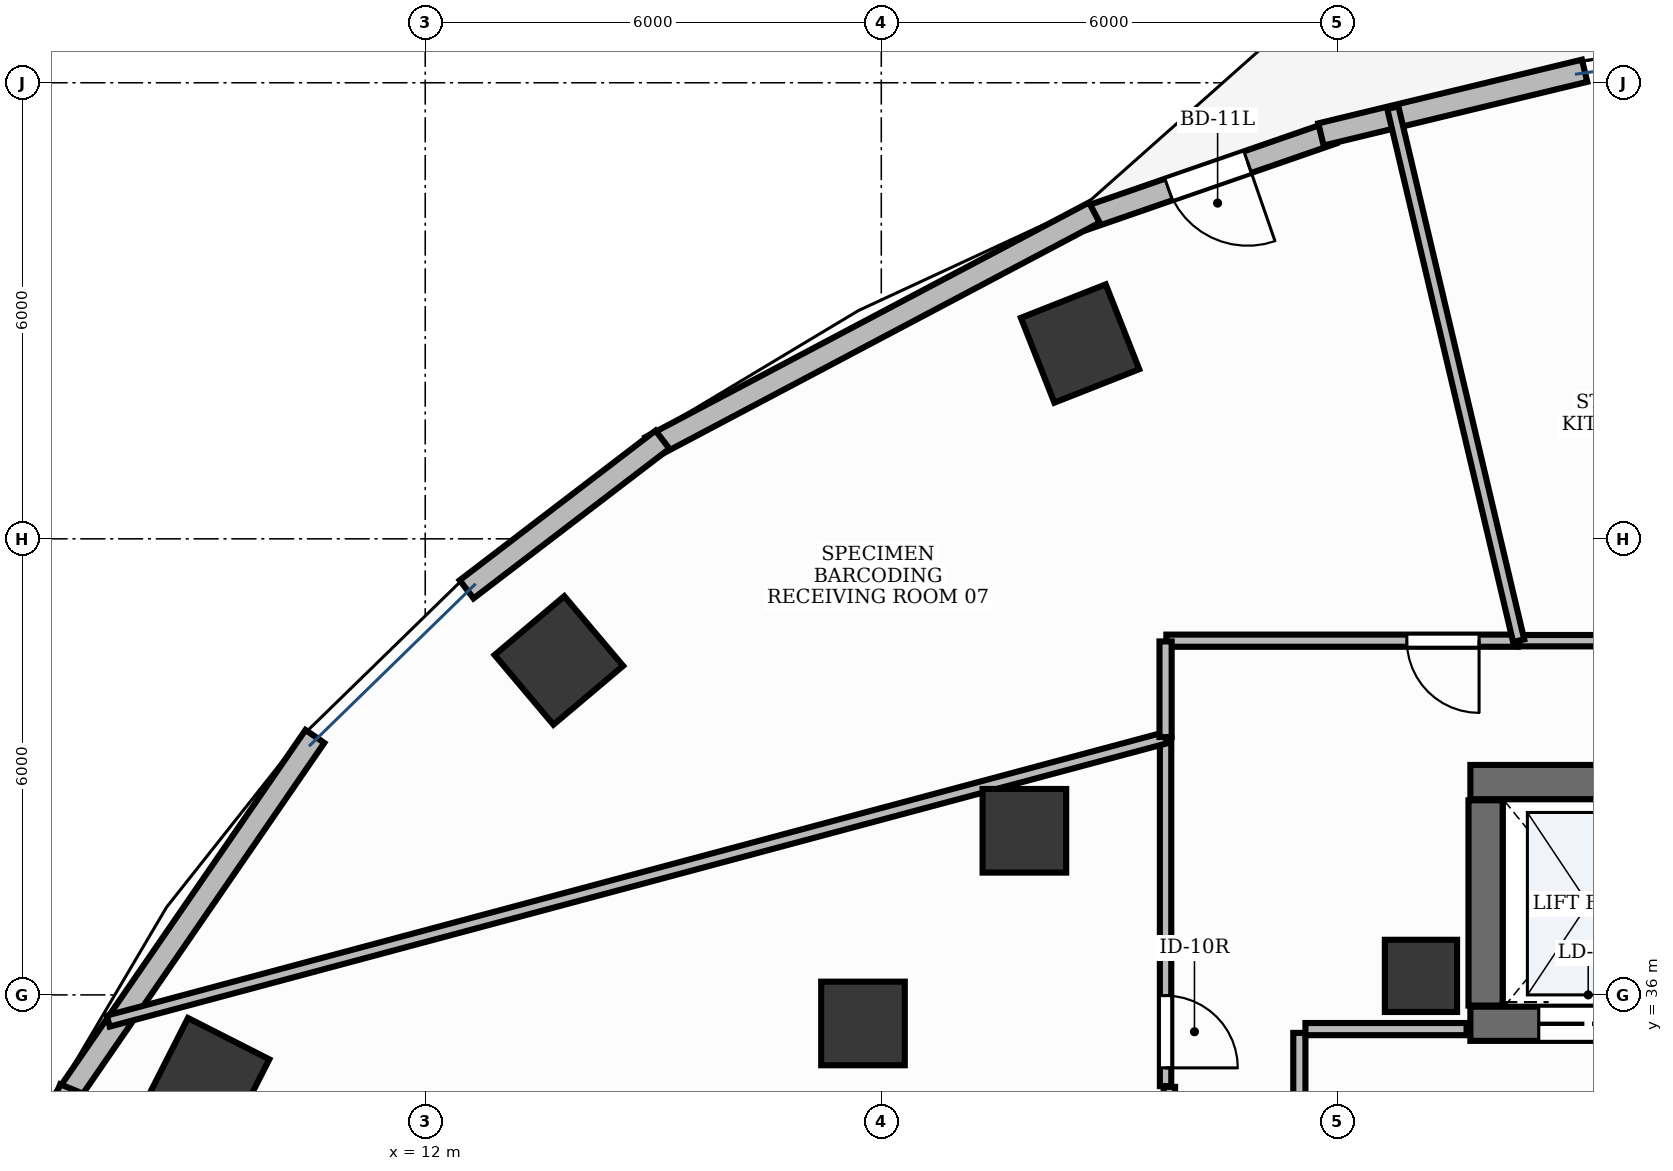
"""IFC4 building model, lengths in metres.
Left out: names, types, materials, properties, quantities, classifications, styles, units other than length and angle.
Written with IfcOpenShell. Run it as: python <this file> out.ifc"""

import sys

from ifc_helpers import new_model, si_unit, direction, frame, frame_2d, origin, origin_2d, place, context, subcontext, project, spatial, rectangle, extrude, element, fill, save


model = new_model("IFC4")
c1 = context("Model", 3, precision=1e-05, world=origin(), true_north=direction((0.0, 1.0)))
c2 = subcontext(c1, "Body", "Model", "MODEL_VIEW")
j1 = project(units=[si_unit("LENGTHUNIT", "METRE"), si_unit("PLANEANGLEUNIT", "RADIAN")], contexts=[c1])
p1 = place(None, origin())
s1 = spatial("IfcSite", under=j1, at=p1, CompositionType="ELEMENT")
p2 = place(p1, origin())
s2 = spatial("IfcBuilding", under=s1, at=p2, CompositionType="ELEMENT")
p3 = place(p2, frame((0.0, 0.0, 136.2)))
s3 = spatial("IfcBuildingStorey", under=s2, at=p3, CompositionType="ELEMENT", Elevation=136.2)
p4 = place(p3, frame((25.75, 38.8, 0.0), z_axis=(0.0, 0.0, 1.0), x_axis=(1.0, 0.0, 0.0)))
e1 = element("IfcWall", 1, at=p4, inside=s3, PredefinedType="SHEAR", context=c2, shape_type="SweptSolid", body=[
    extrude(rectangle(XDim=3.1, YDim=0.45, at=frame_2d((1.55, 0.0))), origin(), (0.0, 0.0, 1.0), 3.9),
])
p5 = place(p3, frame((25.75, 35.62, 0.0), z_axis=(0.0, 0.0, 1.0), x_axis=(1.0, 0.0, 0.0)))
e2 = element("IfcWall", 2, at=p5, inside=s3, PredefinedType="SHEAR", context=c2, shape_type="SweptSolid", body=[
    extrude(rectangle(XDim=3.1, YDim=0.45, at=frame_2d((1.55, 0.0))), origin(), (0.0, 0.0, 1.0), 3.9),
])
p6 = place(p5, frame((0.9, 0.0, 0.0)))
e3 = element("IfcOpeningElement", 3, at=p6, cuts=e2, PredefinedType="OPENING", context=c2, shape_type="SweptSolid", body=[
    extrude(rectangle(XDim=1.3, YDim=2.2, at=frame_2d((0.65, 1.1))), frame((0.0, 0.24, 0.0), z_axis=(0.0, -1.0, 0.0), x_axis=(1.0, 0.0, 0.0)), (0.0, 0.0, 1.0), 0.48),
])
p7 = place(p3, frame((25.95, 35.86, 0.0), z_axis=(0.0, 0.0, 1.0), x_axis=(0.0, 1.0, 0.0)))
e4 = element("IfcWall", 4, at=p7, inside=s3, PredefinedType="SHEAR", context=c2, shape_type="SweptSolid", body=[
    extrude(rectangle(XDim=2.7, YDim=0.45, at=frame_2d((1.35, 0.0))), origin(), (0.0, 0.0, 1.0), 3.9),
])
p8 = place(p3, frame((25.1, 36.25, -0.0), z_axis=(0.0, 0.0, 1.0), x_axis=(1.0, 0.0, 0.0)))
e5 = element("IfcColumn", 5, at=p8, inside=s3, PredefinedType="PILASTER", context=c2, shape_type="SweptSolid", body=[
    extrude(rectangle(XDim=0.95, YDim=0.95, at=origin_2d()), origin(), (0.0, 0.0, 1.0), 3.901),
])
for number, where, z_axis, x_axis in (
    (6, (20.615, 44.569, -0.0), (0.0, 0.0, 1.0), (0.93, 0.367, 0.0)),
    (7, (13.758, 40.4, -0.0), (0.0, 0.0, 1.0), (0.764, 0.645, 0.0)),
):
    element("IfcColumn", number, at=place(p3, frame(where, z_axis=z_axis, x_axis=x_axis)), inside=s3, PredefinedType="COLUMN", context=c2, shape_type="SweptSolid", body=[
        extrude(rectangle(XDim=1.2, YDim=1.2, at=origin_2d()), origin(), (0.0, 0.0, 1.0), 3.901),
    ])
p9 = place(p3, frame((19.883, 38.159, -0.0), z_axis=(0.0, 0.0, 1.0), x_axis=(1.0, 0.0, 0.0)))
e8 = element("IfcColumn", 8, at=p9, inside=s3, PredefinedType="COLUMN", context=c2, shape_type="SweptSolid", body=[
    extrude(rectangle(XDim=1.1, YDim=1.1, at=origin_2d()), origin(), (0.0, 0.0, 1.0), 3.901),
])
p10 = place(p3, frame((9.142, 34.889, -0.0), z_axis=(0.0, 0.0, 1.0), x_axis=(0.453057191132, 0.891481453292, 0.0)))
e9 = element("IfcColumn", 9, at=p10, inside=s3, PredefinedType="COLUMN", context=c2, shape_type="SweptSolid", body=[
    extrude(rectangle(XDim=1.2, YDim=1.2, at=origin_2d()), origin(), (0.0, 0.0, 1.0), 3.901),
])
p11 = place(p3, frame((17.759, 35.624, -0.0), z_axis=(0.0, 0.0, 1.0), x_axis=(1.0, 0.0, 0.0)))
e10 = element("IfcColumn", 10, at=p11, inside=s3, PredefinedType="COLUMN", context=c2, shape_type="SweptSolid", body=[
    extrude(rectangle(XDim=1.1, YDim=1.1, at=origin_2d()), origin(), (0.0, 0.0, 1.0), 3.901),
])
p12 = place(p3, frame((23.938, 47.343, 0.0), z_axis=(0.0, 0.0, 1.0), x_axis=(-0.944878029854, -0.3274225232, 0.0)))
e11 = element("IfcWall", 11, at=p12, inside=s3, PredefinedType="STANDARD", context=c2, shape_type="SweptSolid", body=[
    extrude(rectangle(XDim=3.467, YDim=0.3, at=frame_2d((1.734, 0.0))), origin(), (0.0, 0.0, 1.0), 3.9),
])
p13 = place(p12, frame((1.184, 0.0, 0.0)))
e12 = element("IfcOpeningElement", 12, at=p13, cuts=e11, PredefinedType="OPENING", context=c2, shape_type="SweptSolid", body=[
    extrude(rectangle(XDim=1.1, YDim=2.15, at=frame_2d((0.55, 1.075))), frame((0.0, 0.165, 0.0), z_axis=(0.0, -1.0, 0.0), x_axis=(1.0, 0.0, 0.0)), (0.0, 0.0, 1.0), 0.33),
])
p14 = place(p3, frame((27.253, 48.158, 0.0), z_axis=(0.0, 0.0, 1.0), x_axis=(-0.972043452321, -0.234801036625, 0.0)))
e13 = element("IfcWall", 13, at=p14, inside=s3, PredefinedType="STANDARD", context=c2, shape_type="SweptSolid", body=[
    extrude(rectangle(XDim=3.569, YDim=0.3, at=frame_2d((1.784, 0.0))), origin(), (0.0, 0.0, 1.0), 3.9),
])
p15 = place(p3, frame((20.802, 46.292, 0.0), z_axis=(0.0, 0.0, 1.0), x_axis=(-0.883986649445, -0.467512142734, 0.0)))
e14 = element("IfcWall", 14, at=p15, inside=s3, PredefinedType="STANDARD", context=c2, shape_type="SweptSolid", body=[
    extrude(rectangle(XDim=6.601, YDim=0.3, at=frame_2d((3.301, 0.0))), origin(), (0.0, 0.0, 1.0), 3.47),
])
p16 = place(p3, frame((15.121, 43.305, 0.0), z_axis=(0.0, 0.0, 1.0), x_axis=(-0.794500987227, -0.607262860132, 0.0)))
e15 = element("IfcWall", 15, at=p16, inside=s3, PredefinedType="STANDARD", context=c2, shape_type="SweptSolid", body=[
    extrude(rectangle(XDim=3.243, YDim=0.3, at=frame_2d((1.622, 0.0))), origin(), (0.0, 0.0, 1.0), 3.47),
])
p17 = place(p3, frame((10.548, 39.4, 0.0), z_axis=(0.0, 0.0, 1.0), x_axis=(-0.566825798999, -0.823837674296, 0.0)))
e16 = element("IfcWall", 16, at=p17, inside=s3, PredefinedType="STANDARD", context=c2, shape_type="SweptSolid", body=[
    extrude(rectangle(XDim=5.826, YDim=0.3, at=frame_2d((2.913, 0.0))), origin(), (0.0, 0.0, 1.0), 3.9),
])
p18 = place(p3, frame((7.336, 34.767, 0.0), z_axis=(0.0, 0.0, 1.0), x_axis=(-0.378421675944, -0.925633315722, 0.0)))
e17 = element("IfcWall", 17, at=p18, inside=s3, PredefinedType="STANDARD", context=c2, shape_type="SweptSolid", body=[
    extrude(rectangle(XDim=2.881, YDim=0.3, at=frame_2d((1.441, 0.0))), origin(), (0.0, 0.0, 1.0), 3.9),
])
p19 = place(p3, frame((23.5, 32.1, 0.0), z_axis=(0.0, 0.0, 1.0), x_axis=(0.0, 1.0, 0.0)))
e18 = element("IfcWall", 18, at=p19, inside=s3, PredefinedType="PARTITIONING", context=c2, shape_type="SweptSolid", body=[
    extrude(rectangle(XDim=3.4, YDim=0.16, at=frame_2d((1.7, 0.0))), origin(), (0.0, 0.0, 1.0), 2.91),
])
p20 = place(p19, frame((1.175, 0.0, 0.0)))
e19 = element("IfcOpeningElement", 19, at=p20, cuts=e18, PredefinedType="OPENING", context=c2, shape_type="SweptSolid", body=[
    extrude(rectangle(XDim=1.05, YDim=2.15, at=frame_2d((0.525, 1.075))), frame((0.0, 0.095, 0.0), z_axis=(0.0, -1.0, 0.0), x_axis=(1.0, 0.0, 0.0)), (0.0, 0.0, 1.0), 0.19),
])
p21 = place(p3, frame((23.58, 35.55, 0.0), z_axis=(0.0, 0.0, 1.0), x_axis=(1.0, 0.0, 0.0)))
e20 = element("IfcWall", 20, at=p21, inside=s3, PredefinedType="PARTITIONING", context=c2, shape_type="SweptSolid", body=[
    extrude(rectangle(XDim=2.12, YDim=0.16, at=frame_2d((1.06, 0.0))), origin(), (0.0, 0.0, 1.0), 2.91),
])
p22 = place(p3, frame((30.41, 40.66, 0.0), z_axis=(0.0, 0.0, 1.0), x_axis=(-1.0, 0.0, 0.0)))
e21 = element("IfcWall", 21, at=p22, inside=s3, PredefinedType="PARTITIONING", context=c2, shape_type="SweptSolid", body=[
    extrude(rectangle(XDim=4.025, YDim=0.15, at=frame_2d((2.012, 0.0))), origin(), (0.0, 0.0, 1.0), 2.91),
])
p23 = place(p22, frame((0.24, 0.0, 0.0)))
e22 = element("IfcOpeningElement", 22, at=p23, cuts=e21, PredefinedType="OPENING", context=c2, shape_type="SweptSolid", body=[
    extrude(rectangle(XDim=0.95, YDim=2.15, at=frame_2d((0.475, 1.075))), frame((0.0, 0.09, 0.0), z_axis=(0.0, -1.0, 0.0), x_axis=(1.0, 0.0, 0.0)), (0.0, 0.0, 1.0), 0.18),
])
p24 = place(p3, frame((21.74, 39.383, 0.0), z_axis=(0.0, 0.0, 1.0), x_axis=(0.0, -1.0, 0.0)))
e23 = element("IfcWall", 23, at=p24, inside=s3, PredefinedType="PARTITIONING", context=c2, shape_type="SweptSolid", body=[
    extrude(rectangle(XDim=4.583, YDim=0.15, at=frame_2d((2.291, 0.0))), origin(), (0.0, 0.0, 1.0), 2.91),
])
p25 = place(p24, frame((3.393, 0.0, 0.0)))
e24 = element("IfcOpeningElement", 24, at=p25, cuts=e23, PredefinedType="OPENING", context=c2, shape_type="SweptSolid", body=[
    extrude(rectangle(XDim=0.95, YDim=2.15, at=frame_2d((0.475, 1.075))), frame((0.0, 0.09, 0.0), z_axis=(0.0, -1.0, 0.0), x_axis=(1.0, 0.0, 0.0)), (0.0, 0.0, 1.0), 0.18),
])
p26 = place(p3, frame((26.375, 40.66, 0.0), z_axis=(0.0, 0.0, 1.0), x_axis=(-1.0, 0.0, 0.0)))
e25 = element("IfcWall", 25, at=p26, inside=s3, PredefinedType="PARTITIONING", context=c2, shape_type="SweptSolid", body=[
    extrude(rectangle(XDim=4.625, YDim=0.16, at=frame_2d((2.312, 0.0))), origin(), (0.0, 0.0, 1.0), 2.91),
])
p27 = place(p26, frame((0.51, 0.0, 0.0)))
e26 = element("IfcOpeningElement", 26, at=p27, cuts=e25, PredefinedType="OPENING", context=c2, shape_type="SweptSolid", body=[
    extrude(rectangle(XDim=0.95, YDim=2.15, at=frame_2d((0.475, 1.075))), frame((0.0, 0.095, 0.0), z_axis=(0.0, -1.0, 0.0), x_axis=(1.0, 0.0, 0.0)), (0.0, 0.0, 1.0), 0.19),
])
p28 = place(p3, frame((26.385, 40.66, 0.0), z_axis=(0.0, 0.0, 1.0), x_axis=(-0.229741864883, 0.97325159929, 0.0)))
e27 = element("IfcWall", 27, at=p28, inside=s3, PredefinedType="PARTITIONING", context=c2, shape_type="SweptSolid", body=[
    extrude(rectangle(XDim=7.205, YDim=0.15, at=frame_2d((3.603, 0.0))), origin(), (0.0, 0.0, 1.0), 2.91),
])
p29 = place(p3, frame((7.83, 35.655, 0.0), z_axis=(0.0, 0.0, 1.0), x_axis=(0.965924441149, 0.258824214459, 0.0)))
e28 = element("IfcWall", 28, at=p29, inside=s3, PredefinedType="PARTITIONING", context=c2, shape_type="SweptSolid", body=[
    extrude(rectangle(XDim=14.401, YDim=0.15, at=frame_2d((7.2, 0.0))), origin(), (0.0, 0.0, 1.0), 2.91),
])
p30 = place(p3, frame((21.79, 34.79, 0.0), z_axis=(0.0, 0.0, 1.0), x_axis=(0.0, -1.0, 0.0)))
e29 = element("IfcWall", 29, at=p30, inside=s3, PredefinedType="PARTITIONING", context=c2, shape_type="SweptSolid", body=[
    extrude(rectangle(XDim=0.538, YDim=0.15, at=frame_2d((0.269, 0.0))), origin(), (0.0, 0.0, 1.0), 2.91),
])
p31 = place(p3, frame((21.74, 40.65, 0.0), z_axis=(0.0, 0.0, 1.0), x_axis=(0.0, -1.0, 0.0)))
e30 = element("IfcWall", 30, at=p31, inside=s3, PredefinedType="PARTITIONING", context=c2, shape_type="SweptSolid", body=[
    extrude(rectangle(XDim=1.257, YDim=0.16, at=frame_2d((0.629, 0.0))), origin(), (0.0, 0.0, 1.0), 2.91),
])
p32 = place(p13, origin())
e31 = element("IfcDoor", 31, at=p32, inside=s3, OperationType="SINGLE_SWING_LEFT", PredefinedType="DOOR", context=c2, shape_type="SweptSolid", body=[
    extrude(rectangle(XDim=1.1, YDim=2.15, at=frame_2d((0.55, 1.075))), frame((0.0, 0.025, 0.0), z_axis=(0.0, -1.0, 0.0), x_axis=(1.0, 0.0, 0.0)), (0.0, 0.0, 1.0), 0.05),
])
fill(e12, e31)
p33 = place(p6, origin())
e32 = element("IfcDoor", 32, at=p33, inside=s3, OperationType="DOUBLE_DOOR_SLIDING", PredefinedType="DOOR", context=c2, shape_type="SweptSolid", body=[
    extrude(rectangle(XDim=1.3, YDim=2.2, at=frame_2d((0.65, 1.1))), frame((0.0, 0.025, 0.0), z_axis=(0.0, -1.0, 0.0), x_axis=(1.0, 0.0, 0.0)), (0.0, 0.0, 1.0), 0.05),
])
fill(e3, e32)
p34 = place(p25, origin())
e33 = element("IfcDoor", 33, at=p34, inside=s3, OperationType="SINGLE_SWING_RIGHT", PredefinedType="DOOR", context=c2, shape_type="SweptSolid", body=[
    extrude(rectangle(XDim=0.95, YDim=2.15, at=frame_2d((0.475, 1.075))), frame((0.0, 0.025, 0.0), z_axis=(0.0, -1.0, 0.0), x_axis=(1.0, 0.0, 0.0)), (0.0, 0.0, 1.0), 0.05),
])
fill(e24, e33)
p35 = place(p27, origin())
e34 = element("IfcDoor", 34, at=p35, inside=s3, OperationType="SINGLE_SWING_LEFT", PredefinedType="DOOR", context=c2, shape_type="SweptSolid", body=[
    extrude(rectangle(XDim=0.95, YDim=2.15, at=frame_2d((0.475, 1.075))), frame((0.0, 0.025, 0.0), z_axis=(0.0, -1.0, 0.0), x_axis=(1.0, 0.0, 0.0)), (0.0, 0.0, 1.0), 0.05),
])
fill(e26, e34)
save(model, sys.argv[1])
